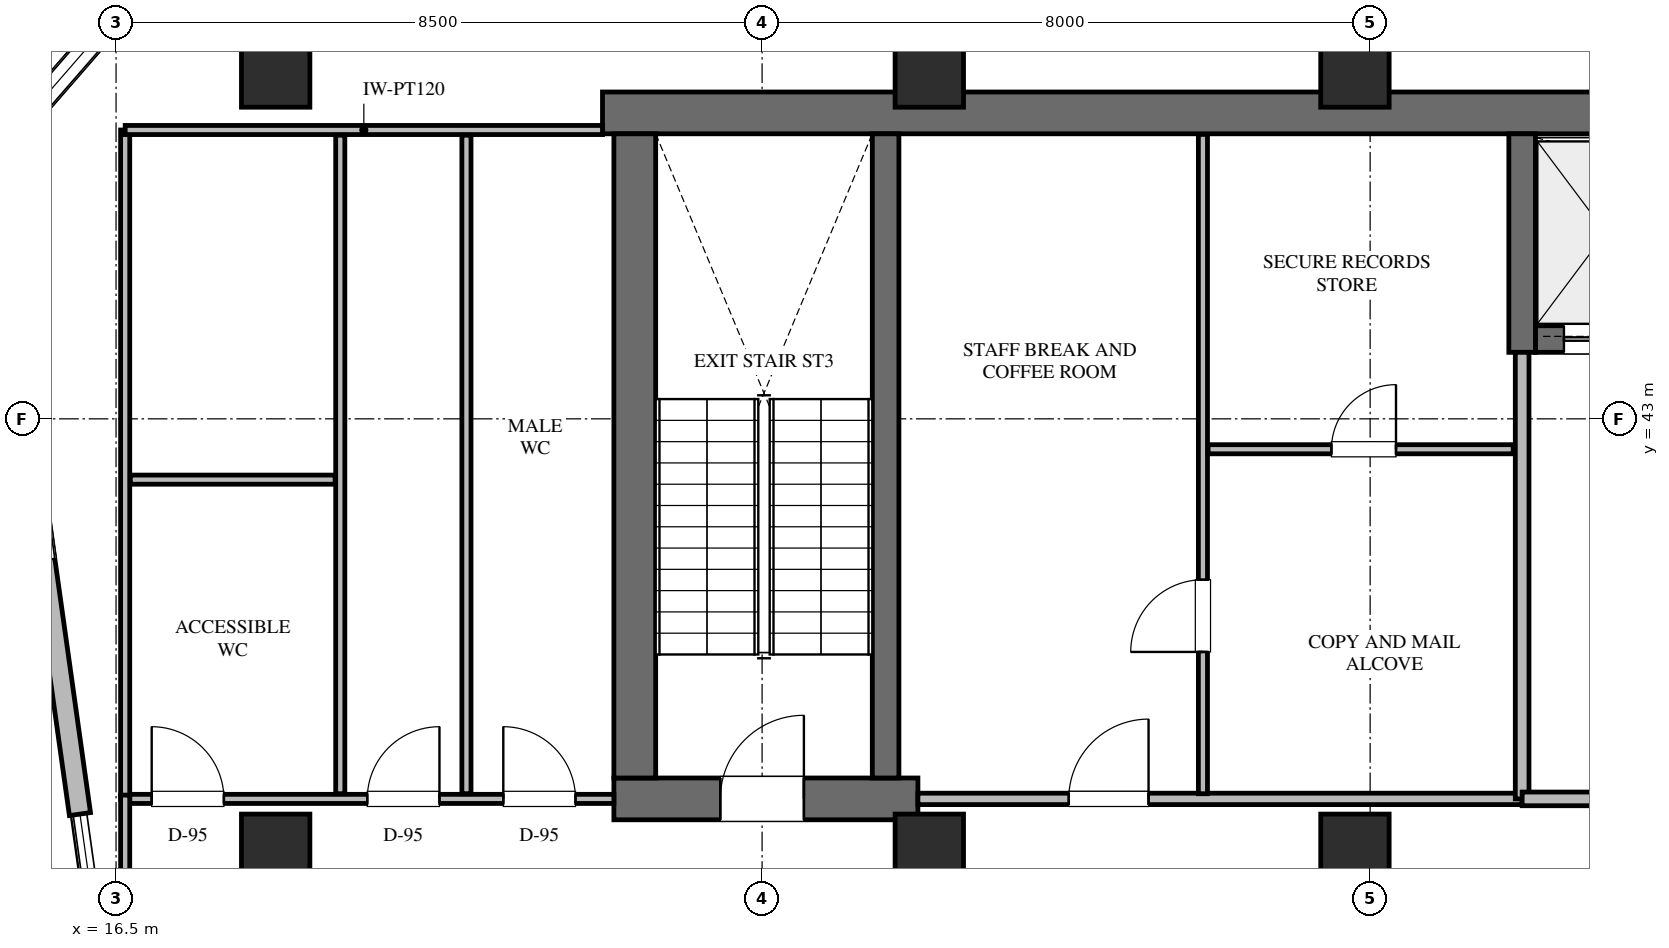
"""IFC4 building model, lengths in metres.
Left out: names, types, materials, properties, quantities, classifications, styles, units other than length and angle.
Written with IfcOpenShell. Run it as: python <this file> out.ifc"""

import sys

from ifc_helpers import new_model, si_unit, direction, frame, frame_2d, origin, origin_2d, place, context, subcontext, project, spatial, rectangle, extrude, element, fill, save


model = new_model("IFC4")
c1 = context("Model", 3, precision=1e-05, world=origin(), true_north=direction((0.0, 1.0)))
c2 = subcontext(c1, "Body", "Model", "MODEL_VIEW")
j1 = project(units=[si_unit("LENGTHUNIT", "METRE"), si_unit("PLANEANGLEUNIT", "RADIAN")], contexts=[c1])
p1 = place(None, origin())
s1 = spatial("IfcSite", under=j1, at=p1, CompositionType="ELEMENT")
p2 = place(p1, origin())
s2 = spatial("IfcBuilding", under=s1, at=p2, CompositionType="ELEMENT")
p3 = place(p2, frame((0.0, 0.0, 220.5)))
s3 = spatial("IfcBuildingStorey", under=s2, at=p3, CompositionType="ELEMENT", Elevation=220.5)
p4 = place(p3, frame((22.9, 47.025, 0.0), z_axis=(0.0, 0.0, 1.0), x_axis=(1.0, 0.0, 0.0)))
e1 = element("IfcWall", 1, at=p4, inside=s3, PredefinedType="SHEAR", context=c2, shape_type="SweptSolid", body=[
    extrude(rectangle(XDim=43.5, YDim=0.55, at=frame_2d((21.75, 0.0))), origin(), (0.0, 0.0, 1.0), 4.5),
])
p5 = place(p3, frame((35.175, 44.05, 0.0), z_axis=(0.0, 0.0, 1.0), x_axis=(1.0, 0.0, 0.0)))
e2 = element("IfcWall", 2, at=p5, inside=s3, PredefinedType="SHEAR", context=c2, shape_type="SweptSolid", body=[
    extrude(rectangle(XDim=9.7, YDim=0.35, at=frame_2d((4.85, 0.0))), origin(), (0.0, 0.0, 1.0), 4.5),
])
p6 = place(p5, frame((0.375, 0.0, 0.0)))
e3 = element("IfcOpeningElement", 3, at=p6, cuts=e2, PredefinedType="OPENING", context=c2, shape_type="SweptSolid", body=[
    extrude(rectangle(XDim=1.1, YDim=2.2, at=frame_2d((0.55, 1.1))), frame((0.0, 0.185, 0.0), z_axis=(0.0, -1.0, 0.0), x_axis=(1.0, 0.0, 0.0)), (0.0, 0.0, 1.0), 0.37),
])
p7 = place(p5, frame((2.375, 0.0, 0.0)))
e4 = element("IfcOpeningElement", 4, at=p7, cuts=e2, PredefinedType="OPENING", context=c2, shape_type="SweptSolid", body=[
    extrude(rectangle(XDim=1.1, YDim=2.2, at=frame_2d((0.55, 1.1))), frame((0.0, 0.185, 0.0), z_axis=(0.0, -1.0, 0.0), x_axis=(1.0, 0.0, 0.0)), (0.0, 0.0, 1.0), 0.37),
])
p8 = place(p5, frame((4.375, 0.0, 0.0)))
e5 = element("IfcOpeningElement", 5, at=p8, cuts=e2, PredefinedType="OPENING", context=c2, shape_type="SweptSolid", body=[
    extrude(rectangle(XDim=1.1, YDim=2.2, at=frame_2d((0.55, 1.1))), frame((0.0, 0.185, 0.0), z_axis=(0.0, -1.0, 0.0), x_axis=(1.0, 0.0, 0.0)), (0.0, 0.0, 1.0), 0.37),
])
p9 = place(p5, frame((6.375, 0.0, 0.0)))
e6 = element("IfcOpeningElement", 6, at=p9, cuts=e2, PredefinedType="OPENING", context=c2, shape_type="SweptSolid", body=[
    extrude(rectangle(XDim=1.1, YDim=2.2, at=frame_2d((0.55, 1.1))), frame((0.0, 0.185, 0.0), z_axis=(0.0, -1.0, 0.0), x_axis=(1.0, 0.0, 0.0)), (0.0, 0.0, 1.0), 0.37),
])
p10 = place(p3, frame((35.0, 43.875, 0.0), z_axis=(0.0, 0.0, 1.0), x_axis=(0.0, 1.0, 0.0)))
e7 = element("IfcWall", 7, at=p10, inside=s3, PredefinedType="SHEAR", context=c2, shape_type="SweptSolid", body=[
    extrude(rectangle(XDim=2.875, YDim=0.35, at=frame_2d((1.438, 0.0))), origin(), (0.0, 0.0, 1.0), 4.5),
])
p11 = place(p3, frame((23.05, 38.0, 0.0), z_axis=(0.0, 0.0, 1.0), x_axis=(1.0, 0.0, 0.0)))
e8 = element("IfcWall", 8, at=p11, inside=s3, PredefinedType="SHEAR", context=c2, shape_type="SweptSolid", body=[
    extrude(rectangle(XDim=4.0, YDim=0.55, at=frame_2d((2.0, 0.0))), origin(), (0.0, 0.0, 1.0), 4.5),
])
p12 = place(p11, frame((1.4, 0.0, 0.0)))
e9 = element("IfcOpeningElement", 9, at=p12, cuts=e8, PredefinedType="OPENING", context=c2, shape_type="SweptSolid", body=[
    extrude(rectangle(XDim=1.1, YDim=2.2, at=frame_2d((0.55, 1.1))), frame((0.0, 0.285, 0.0), z_axis=(0.0, -1.0, 0.0), x_axis=(1.0, 0.0, 0.0)), (0.0, 0.0, 1.0), 0.57),
])
p13 = place(p3, frame((23.325, 38.275, 0.0), z_axis=(0.0, 0.0, 1.0), x_axis=(0.0, 1.0, 0.0)))
e10 = element("IfcWall", 10, at=p13, inside=s3, PredefinedType="SHEAR", context=c2, shape_type="SweptSolid", body=[
    extrude(rectangle(XDim=8.475, YDim=0.55, at=frame_2d((4.238, 0.0))), origin(), (0.0, 0.0, 1.0), 4.5),
])
p14 = place(p3, frame((26.625, 38.275, 0.0), z_axis=(0.0, 0.0, 1.0), x_axis=(0.0, 1.0, 0.0)))
e11 = element("IfcWall", 11, at=p14, inside=s3, PredefinedType="SHEAR", context=c2, shape_type="SweptSolid", body=[
    extrude(rectangle(XDim=8.475, YDim=0.35, at=frame_2d((4.238, 0.0))), origin(), (0.0, 0.0, 1.0), 4.5),
])
for number, where, z_axis, x_axis in (
    (12, (32.8, 37.35, 0.0), (0.0, 0.0, 1.0), (1.0, 0.0, 0.0)),
    (13, (32.8, 47.55, 0.0), (0.0, 0.0, 1.0), (1.0, 0.0, 0.0)),
    (14, (27.2, 37.35, 0.0), (0.0, 0.0, 1.0), (1.0, 0.0, 0.0)),
    (15, (27.2, 47.55, 0.0), (0.0, 0.0, 1.0), (1.0, 0.0, 0.0)),
    (16, (18.6, 37.35, 0.0), (0.0, 0.0, 1.0), (1.0, 0.0, 0.0)),
    (17, (18.6, 47.55, 0.0), (0.0, 0.0, 1.0), (1.0, 0.0, 0.0)),
):
    element("IfcColumn", number, at=place(p3, frame(where, z_axis=z_axis, x_axis=x_axis)), inside=s3, PredefinedType="COLUMN", context=c2, shape_type="SweptSolid", body=[
        extrude(rectangle(XDim=0.9, YDim=0.9, at=origin_2d()), origin(), (0.0, 0.0, 1.0), 4.5),
    ])
p15 = place(p3, frame((16.025, 37.8, 0.0), z_axis=(0.0, 0.0, 1.0), x_axis=(-0.13918102754, 0.990266954701, 0.0)))
e18 = element("IfcWall", 18, at=p15, inside=s3, PredefinedType="STANDARD", context=c2, shape_type="SweptSolid", body=[
    extrude(rectangle(XDim=8.667, YDim=0.28, at=frame_2d((4.333, 0.0))), origin(), (0.0, 0.0, 1.0), 4.22),
])
p16 = place(p15, frame((3.374, 0.0, 0.65)))
e19 = element("IfcOpeningElement", 19, at=p16, cuts=e18, PredefinedType="OPENING", context=c2, shape_type="SweptSolid", body=[
    extrude(rectangle(XDim=1.8, YDim=2.1, at=frame_2d((0.9, 1.05))), frame((0.0, 0.15, 0.0), z_axis=(0.0, -1.0, 0.0), x_axis=(1.0, 0.0, 0.0)), (0.0, 0.0, 1.0), 0.3),
])
p17 = place(p3, frame((14.819, 46.383, 0.0), z_axis=(0.0, 0.0, 1.0), x_axis=(0.656071351282, 0.754698868442, 0.0)))
e20 = element("IfcWall", 20, at=p17, inside=s3, PredefinedType="STANDARD", context=c2, shape_type="SweptSolid", body=[
    extrude(rectangle(XDim=2.646, YDim=0.28, at=frame_2d((1.323, 0.0))), origin(), (0.0, 0.0, 1.0), 4.22),
])
p18 = place(p17, frame((0.416, 0.0, 0.65)))
e21 = element("IfcOpeningElement", 21, at=p18, cuts=e20, PredefinedType="OPENING", context=c2, shape_type="SweptSolid", body=[
    extrude(rectangle(XDim=1.8, YDim=2.1, at=frame_2d((0.9, 1.05))), frame((0.0, 0.15, 0.0), z_axis=(0.0, -1.0, 0.0), x_axis=(1.0, 0.0, 0.0)), (0.0, 0.0, 1.0), 0.3),
])
p19 = place(p3, frame((27.05, 38.0, 0.0), z_axis=(0.0, 0.0, 1.0), x_axis=(1.0, 0.0, 0.0)))
e22 = element("IfcWall", 22, at=p19, inside=s3, PredefinedType="PARTITIONING", context=c2, shape_type="SweptSolid", body=[
    extrude(rectangle(XDim=7.95, YDim=0.15, at=frame_2d((3.975, 0.0))), origin(), (0.0, 0.0, 1.0), 3.447),
])
p20 = place(p19, frame((1.985, 0.0, 0.0)))
e23 = element("IfcOpeningElement", 23, at=p20, cuts=e22, PredefinedType="OPENING", context=c2, shape_type="SweptSolid", body=[
    extrude(rectangle(XDim=1.05, YDim=2.2, at=frame_2d((0.525, 1.1))), frame((0.0, 0.085, 0.0), z_axis=(0.0, -1.0, 0.0), x_axis=(1.0, 0.0, 0.0)), (0.0, 0.0, 1.0), 0.17),
])
p21 = place(p3, frame((35.0, 38.0, 0.0), z_axis=(0.0, 0.0, 1.0), x_axis=(0.0, 1.0, 0.0)))
e24 = element("IfcWall", 24, at=p21, inside=s3, PredefinedType="STANDARD", context=c2, shape_type="SweptSolid", body=[
    extrude(rectangle(XDim=5.875, YDim=0.18, at=frame_2d((2.938, 0.0))), origin(), (0.0, 0.0, 1.0), 4.22),
])
p22 = place(p3, frame((30.8, 38.068, 0.0), z_axis=(0.0, 0.0, 1.0), x_axis=(0.0, 1.0, 0.0)))
e25 = element("IfcWall", 25, at=p22, inside=s3, PredefinedType="PARTITIONING", context=c2, shape_type="SweptSolid", body=[
    extrude(rectangle(XDim=8.674, YDim=0.12, at=frame_2d((4.337, 0.0))), origin(), (0.0, 0.0, 1.0), 4.22),
])
p23 = place(p22, frame((1.865, 0.0, 0.0)))
e26 = element("IfcOpeningElement", 26, at=p23, cuts=e25, PredefinedType="OPENING", context=c2, shape_type="SweptSolid", body=[
    extrude(rectangle(XDim=0.95, YDim=2.15, at=frame_2d((0.475, 1.075))), frame((0.0, 0.07, 0.0), z_axis=(0.0, -1.0, 0.0), x_axis=(1.0, 0.0, 0.0)), (0.0, 0.0, 1.0), 0.14),
])
p24 = place(p3, frame((30.868, 42.6, 0.0), z_axis=(0.0, 0.0, 1.0), x_axis=(1.0, 0.0, 0.0)))
e27 = element("IfcWall", 27, at=p24, inside=s3, PredefinedType="PARTITIONING", context=c2, shape_type="SweptSolid", body=[
    extrude(rectangle(XDim=4.014, YDim=0.12, at=frame_2d((2.007, 0.0))), origin(), (0.0, 0.0, 1.0), 3.447),
])
p25 = place(p24, frame((1.622, 0.0, 0.0)))
e28 = element("IfcOpeningElement", 28, at=p25, cuts=e27, PredefinedType="OPENING", context=c2, shape_type="SweptSolid", body=[
    extrude(rectangle(XDim=0.85, YDim=2.1, at=frame_2d((0.425, 1.05))), frame((0.0, 0.07, 0.0), z_axis=(0.0, -1.0, 0.0), x_axis=(1.0, 0.0, 0.0)), (0.0, 0.0, 1.0), 0.14),
])
p26 = place(p3, frame((35.0, 38.0, 0.0), z_axis=(0.0, 0.0, 1.0), x_axis=(1.0, 0.0, 0.0)))
e29 = element("IfcWall", 29, at=p26, inside=s3, PredefinedType="STANDARD", context=c2, shape_type="SweptSolid", body=[
    extrude(rectangle(XDim=10.05, YDim=0.18, at=frame_2d((5.025, 0.0))), origin(), (0.0, 0.0, 1.0), 3.447),
])
p27 = place(p26, frame((5.858, 0.0, 0.0)))
e30 = element("IfcOpeningElement", 30, at=p27, cuts=e29, PredefinedType="OPENING", context=c2, shape_type="SweptSolid", body=[
    extrude(rectangle(XDim=1.8, YDim=2.2, at=frame_2d((0.9, 1.1))), frame((0.0, 0.1, 0.0), z_axis=(0.0, -1.0, 0.0), x_axis=(1.0, 0.0, 0.0)), (0.0, 0.0, 1.0), 0.2),
])
p28 = place(p3, frame((16.62, 38.0, 0.0), z_axis=(0.0, 0.0, 1.0), x_axis=(1.0, 0.0, 0.0)))
e31 = element("IfcWall", 31, at=p28, inside=s3, PredefinedType="PARTITIONING", context=c2, shape_type="SweptSolid", body=[
    extrude(rectangle(XDim=6.43, YDim=0.12, at=frame_2d((3.215, 0.0))), origin(), (0.0, 0.0, 1.0), 3.447),
])
p29 = place(p28, frame((0.349, 0.0, 0.0)))
e32 = element("IfcOpeningElement", 32, at=p29, cuts=e31, PredefinedType="OPENING", context=c2, shape_type="SweptSolid", body=[
    extrude(rectangle(XDim=0.95, YDim=2.15, at=frame_2d((0.475, 1.075))), frame((0.0, 0.07, 0.0), z_axis=(0.0, -1.0, 0.0), x_axis=(1.0, 0.0, 0.0)), (0.0, 0.0, 1.0), 0.14),
])
p30 = place(p28, frame((3.185, 0.0, 0.0)))
e33 = element("IfcOpeningElement", 33, at=p30, cuts=e31, PredefinedType="OPENING", context=c2, shape_type="SweptSolid", body=[
    extrude(rectangle(XDim=0.95, YDim=2.15, at=frame_2d((0.475, 1.075))), frame((0.0, 0.07, 0.0), z_axis=(0.0, -1.0, 0.0), x_axis=(1.0, 0.0, 0.0)), (0.0, 0.0, 1.0), 0.14),
])
p31 = place(p28, frame((4.975, 0.0, 0.0)))
e34 = element("IfcOpeningElement", 34, at=p31, cuts=e31, PredefinedType="OPENING", context=c2, shape_type="SweptSolid", body=[
    extrude(rectangle(XDim=0.95, YDim=2.15, at=frame_2d((0.475, 1.075))), frame((0.0, 0.07, 0.0), z_axis=(0.0, -1.0, 0.0), x_axis=(1.0, 0.0, 0.0)), (0.0, 0.0, 1.0), 0.14),
])
p32 = place(p3, frame((16.62, 38.0, 0.0), z_axis=(0.0, 0.0, 1.0), x_axis=(0.0, 1.0, 0.0)))
e35 = element("IfcWall", 35, at=p32, inside=s3, PredefinedType="PARTITIONING", context=c2, shape_type="SweptSolid", body=[
    extrude(rectangle(XDim=8.8, YDim=0.12, at=frame_2d((4.4, 0.0))), origin(), (0.0, 0.0, 1.0), 4.22),
])
p33 = place(p3, frame((16.62, 46.8, 0.0), z_axis=(0.0, 0.0, 1.0), x_axis=(1.0, 0.0, 0.0)))
e36 = element("IfcWall", 36, at=p33, inside=s3, PredefinedType="PARTITIONING", context=c2, shape_type="SweptSolid", body=[
    extrude(rectangle(XDim=6.28, YDim=0.12, at=frame_2d((3.14, 0.0))), origin(), (0.0, 0.0, 1.0), 3.447),
])
for number, where, z_axis, x_axis in (
    (37, (19.45, 38.068, 0.0), (0.0, 0.0, 1.0), (0.0, 1.0, 0.0)),
    (38, (21.11, 38.068, 0.0), (0.0, 0.0, 1.0), (0.0, 1.0, 0.0)),
):
    element("IfcWall", number, at=place(p3, frame(where, z_axis=z_axis, x_axis=x_axis)), inside=s3, PredefinedType="PARTITIONING", context=c2, shape_type="SweptSolid", body=[
        extrude(rectangle(XDim=8.664, YDim=0.12, at=frame_2d((4.332, 0.0))), origin(), (0.0, 0.0, 1.0), 4.22),
    ])
p34 = place(p3, frame((16.688, 42.2, 0.0), z_axis=(0.0, 0.0, 1.0), x_axis=(1.0, 0.0, 0.0)))
e39 = element("IfcWall", 39, at=p34, inside=s3, PredefinedType="PARTITIONING", context=c2, shape_type="SweptSolid", body=[
    extrude(rectangle(XDim=2.694, YDim=0.12, at=frame_2d((1.347, 0.0))), origin(), (0.0, 0.0, 1.0), 3.447),
])
p35 = place(p3, frame((16.62, 34.4, 0.0), z_axis=(0.0, 0.0, 1.0), x_axis=(0.0, 1.0, 0.0)))
e40 = element("IfcWall", 40, at=p35, inside=s3, PredefinedType="PARTITIONING", context=c2, shape_type="SweptSolid", body=[
    extrude(rectangle(XDim=3.65, YDim=0.12, at=frame_2d((1.825, 0.0))), origin(), (0.0, 0.0, 1.0), 4.22),
])
p36 = place(p18, origin())
e41 = element("IfcWindow", 41, at=p36, inside=s3, PartitioningType="SINGLE_PANEL", PredefinedType="WINDOW", context=c2, shape_type="SweptSolid", body=[
    extrude(rectangle(XDim=1.8, YDim=2.1, at=frame_2d((0.9, 1.05))), frame((0.0, 0.03, 0.0), z_axis=(0.0, -1.0, 0.0), x_axis=(1.0, 0.0, 0.0)), (0.0, 0.0, 1.0), 0.06),
])
fill(e21, e41)
p37 = place(p12, origin())
e42 = element("IfcDoor", 42, at=p37, inside=s3, OperationType="SINGLE_SWING_RIGHT", PredefinedType="DOOR", context=c2, shape_type="SweptSolid", body=[
    extrude(rectangle(XDim=1.1, YDim=2.2, at=frame_2d((0.55, 1.1))), frame((0.0, 0.025, 0.0), z_axis=(0.0, -1.0, 0.0), x_axis=(1.0, 0.0, 0.0)), (0.0, 0.0, 1.0), 0.05),
])
fill(e9, e42)
p38 = place(p6, origin())
e43 = element("IfcDoor", 43, at=p38, inside=s3, OperationType="DOUBLE_DOOR_SLIDING", PredefinedType="DOOR", context=c2, shape_type="SweptSolid", body=[
    extrude(rectangle(XDim=1.1, YDim=2.2, at=frame_2d((0.55, 1.1))), frame((0.0, 0.025, 0.0), z_axis=(0.0, -1.0, 0.0), x_axis=(1.0, 0.0, 0.0)), (0.0, 0.0, 1.0), 0.05),
])
fill(e3, e43)
p39 = place(p20, origin())
e44 = element("IfcDoor", 44, at=p39, inside=s3, OperationType="SINGLE_SWING_RIGHT", PredefinedType="DOOR", context=c2, shape_type="SweptSolid", body=[
    extrude(rectangle(XDim=1.05, YDim=2.2, at=frame_2d((0.525, 1.1))), frame((0.0, 0.025, 0.0), z_axis=(0.0, -1.0, 0.0), x_axis=(1.0, 0.0, 0.0)), (0.0, 0.0, 1.0), 0.05),
])
fill(e23, e44)
p40 = place(p23, origin())
e45 = element("IfcDoor", 45, at=p40, inside=s3, OperationType="SINGLE_SWING_LEFT", PredefinedType="DOOR", context=c2, shape_type="SweptSolid", body=[
    extrude(rectangle(XDim=0.95, YDim=2.15, at=frame_2d((0.475, 1.075))), frame((0.0, 0.025, 0.0), z_axis=(0.0, -1.0, 0.0), x_axis=(1.0, 0.0, 0.0)), (0.0, 0.0, 1.0), 0.05),
])
fill(e26, e45)
p41 = place(p25, origin())
e46 = element("IfcDoor", 46, at=p41, inside=s3, OperationType="SINGLE_SWING_RIGHT", PredefinedType="DOOR", context=c2, shape_type="SweptSolid", body=[
    extrude(rectangle(XDim=0.85, YDim=2.1, at=frame_2d((0.425, 1.05))), frame((0.0, 0.025, 0.0), z_axis=(0.0, -1.0, 0.0), x_axis=(1.0, 0.0, 0.0)), (0.0, 0.0, 1.0), 0.05),
])
fill(e28, e46)
p42 = place(p29, origin())
e47 = element("IfcDoor", 47, at=p42, inside=s3, OperationType="SINGLE_SWING_LEFT", PredefinedType="DOOR", context=c2, shape_type="SweptSolid", body=[
    extrude(rectangle(XDim=0.95, YDim=2.15, at=frame_2d((0.475, 1.075))), frame((0.0, 0.025, 0.0), z_axis=(0.0, -1.0, 0.0), x_axis=(1.0, 0.0, 0.0)), (0.0, 0.0, 1.0), 0.05),
])
fill(e32, e47)
p43 = place(p30, origin())
e48 = element("IfcDoor", 48, at=p43, inside=s3, OperationType="SINGLE_SWING_RIGHT", PredefinedType="DOOR", context=c2, shape_type="SweptSolid", body=[
    extrude(rectangle(XDim=0.95, YDim=2.15, at=frame_2d((0.475, 1.075))), frame((0.0, 0.025, 0.0), z_axis=(0.0, -1.0, 0.0), x_axis=(1.0, 0.0, 0.0)), (0.0, 0.0, 1.0), 0.05),
])
fill(e33, e48)
p44 = place(p31, origin())
e49 = element("IfcDoor", 49, at=p44, inside=s3, OperationType="SINGLE_SWING_LEFT", PredefinedType="DOOR", context=c2, shape_type="SweptSolid", body=[
    extrude(rectangle(XDim=0.95, YDim=2.15, at=frame_2d((0.475, 1.075))), frame((0.0, 0.025, 0.0), z_axis=(0.0, -1.0, 0.0), x_axis=(1.0, 0.0, 0.0)), (0.0, 0.0, 1.0), 0.05),
])
fill(e34, e49)
save(model, sys.argv[1])
